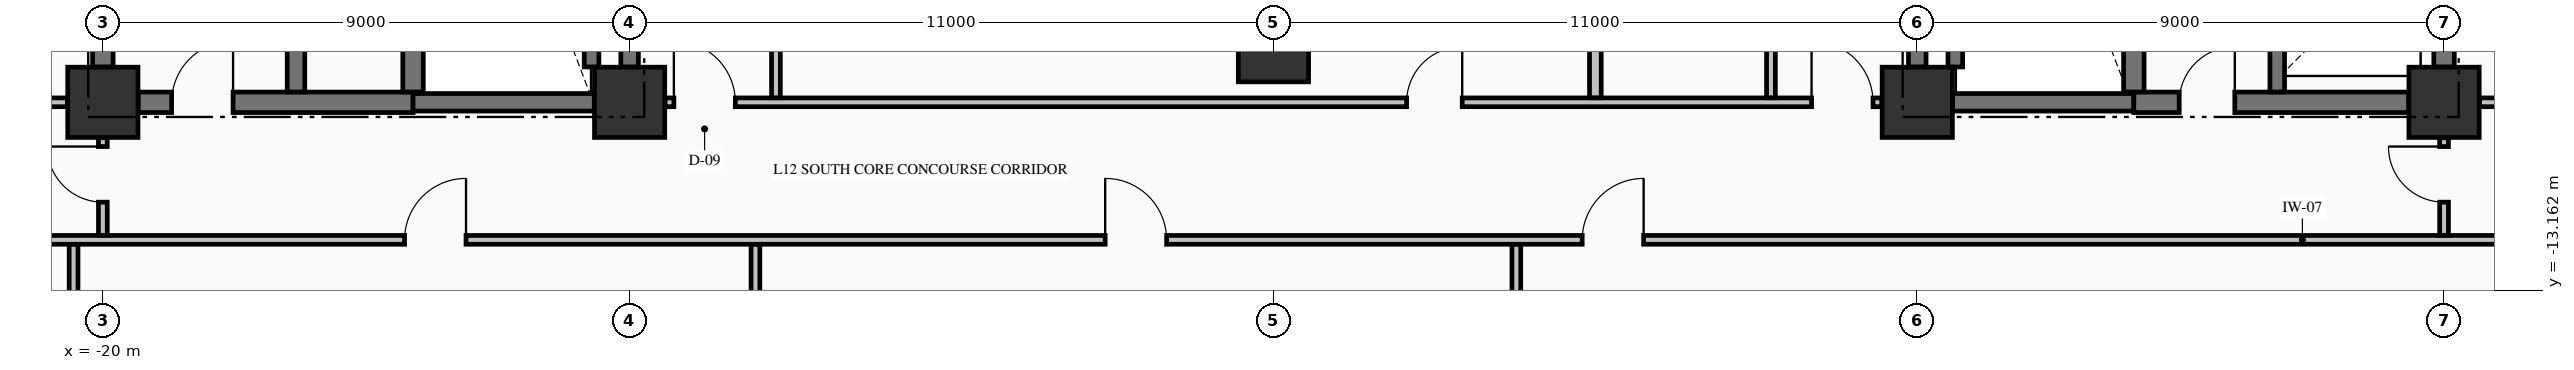
"""IFC4 building model, lengths in metres.
Left out: names, types, materials, properties, quantities, classifications, styles, units other than length and angle.
Written with IfcOpenShell. Run it as: python <this file> out.ifc"""

import sys

from ifc_helpers import new_model, si_unit, direction, frame, frame_2d, origin, origin_2d, place, context, subcontext, project, spatial, rectangle, extrude, element, fill, save


model = new_model("IFC4")
c1 = context("Model", 3, precision=1e-05, world=origin(), true_north=direction((0.0, 1.0)))
c2 = subcontext(c1, "Body", "Model", "MODEL_VIEW")
j1 = project(units=[si_unit("LENGTHUNIT", "METRE"), si_unit("PLANEANGLEUNIT", "RADIAN")], contexts=[c1])
p1 = place(None, origin())
s1 = spatial("IfcSite", under=j1, at=p1, CompositionType="ELEMENT")
p2 = place(p1, origin())
s2 = spatial("IfcBuilding", under=s1, at=p2, CompositionType="ELEMENT")
p3 = place(p2, frame((0.0, 0.0, 52.19)))
s3 = spatial("IfcBuildingStorey", under=s2, at=p3, CompositionType="ELEMENT", Elevation=52.19)
for number, where, z_axis, x_axis in (
    (1, (-20.0, -9.95, -0.425), (0.0, 0.0, 1.0), (1.0, 0.0, 0.0)),
    (2, (-11.0, -9.95, -0.425), (0.0, 0.0, 1.0), (1.0, 0.0, 0.0)),
    (3, (11.0, -9.95, -0.425), (0.0, 0.0, 1.0), (1.0, 0.0, 0.0)),
    (4, (20.0, -9.95, -0.425), (0.0, 0.0, 1.0), (1.0, 0.0, 0.0)),
    (5, (0.0, -9.0, -0.425), (0.0, 0.0, 1.0), (1.0, 0.0, 0.0)),
):
    element("IfcColumn", number, at=place(p3, frame(where, z_axis=z_axis, x_axis=x_axis)), inside=s3, PredefinedType="COLUMN", context=c2, shape_type="SweptSolid", body=[
        extrude(rectangle(XDim=1.2, YDim=1.2, at=origin_2d()), origin(), (0.0, 0.0, 1.0), 5.0),
    ])
p4 = place(p3, frame((-19.396, -9.95, 0.0), z_axis=(0.0, 0.0, 1.0), x_axis=(1.0, 0.0, 0.0)))
e6 = element("IfcWall", 6, at=p4, inside=s3, PredefinedType="SHEAR", context=c2, shape_type="SweptSolid", body=[
    extrude(rectangle(XDim=4.696, YDim=0.35, at=frame_2d((2.348, 0.0))), origin(), (0.0, 0.0, 1.0), 4.575),
])
p5 = place(p4, frame((0.571, 0.0, 0.0)))
e7 = element("IfcOpeningElement", 7, at=p5, cuts=e6, PredefinedType="OPENING", context=c2, shape_type="SweptSolid", body=[
    extrude(rectangle(XDim=1.05, YDim=2.15, at=frame_2d((0.525, 1.075))), frame((0.0, 0.185, 0.0), z_axis=(0.0, -1.0, 0.0), x_axis=(1.0, 0.0, 0.0)), (0.0, 0.0, 1.0), 0.37),
])
for number, where, z_axis, x_axis in (
    (8, (-14.7, -9.95, 0.0), (0.0, 0.0, 1.0), (1.0, 0.0, 0.0)),
    (9, (11.604, -9.95, 0.0), (0.0, 0.0, 1.0), (1.0, 0.0, 0.0)),
):
    element("IfcWall", number, at=place(p3, frame(where, z_axis=z_axis, x_axis=x_axis)), inside=s3, PredefinedType="SHEAR", context=c2, shape_type="SweptSolid", body=[
        extrude(rectangle(XDim=3.096, YDim=0.3, at=frame_2d((1.548, 0.0))), origin(), (0.0, 0.0, 1.0), 4.575),
    ])
p6 = place(p3, frame((14.7, -9.95, 0.0), z_axis=(0.0, 0.0, 1.0), x_axis=(1.0, 0.0, 0.0)))
e10 = element("IfcWall", 10, at=p6, inside=s3, PredefinedType="SHEAR", context=c2, shape_type="SweptSolid", body=[
    extrude(rectangle(XDim=4.696, YDim=0.35, at=frame_2d((2.348, 0.0))), origin(), (0.0, 0.0, 1.0), 4.575),
])
p7 = place(p6, frame((0.775, 0.0, 0.0)))
e11 = element("IfcOpeningElement", 11, at=p7, cuts=e10, PredefinedType="OPENING", context=c2, shape_type="SweptSolid", body=[
    extrude(rectangle(XDim=0.95, YDim=2.15, at=frame_2d((0.475, 1.075))), frame((0.0, 0.185, 0.0), z_axis=(0.0, -1.0, 0.0), x_axis=(1.0, 0.0, 0.0)), (0.0, 0.0, 1.0), 0.37),
])
p8 = place(p3, frame((-23.835, -12.3, 0.0), z_axis=(0.0, 0.0, 1.0), x_axis=(1.0, 0.0, 0.0)))
e12 = element("IfcWall", 12, at=p8, inside=s3, PredefinedType="PARTITIONING", context=c2, shape_type="SweptSolid", body=[
    extrude(rectangle(XDim=52.67, YDim=0.15, at=frame_2d((26.335, 0.0))), origin(), (0.0, 0.0, 1.0), 4.575),
])
p9 = place(p8, frame((8.99, 0.0, 0.0)))
e13 = element("IfcOpeningElement", 13, at=p9, cuts=e12, PredefinedType="OPENING", context=c2, shape_type="SweptSolid", body=[
    extrude(rectangle(XDim=1.05, YDim=2.15, at=frame_2d((0.525, 1.075))), frame((0.0, 0.085, 0.0), z_axis=(0.0, -1.0, 0.0), x_axis=(1.0, 0.0, 0.0)), (0.0, 0.0, 1.0), 0.17),
])
p10 = place(p8, frame((20.96, 0.0, 0.0)))
e14 = element("IfcOpeningElement", 14, at=p10, cuts=e12, PredefinedType="OPENING", context=c2, shape_type="SweptSolid", body=[
    extrude(rectangle(XDim=1.05, YDim=2.15, at=frame_2d((0.525, 1.075))), frame((0.0, 0.085, 0.0), z_axis=(0.0, -1.0, 0.0), x_axis=(1.0, 0.0, 0.0)), (0.0, 0.0, 1.0), 0.17),
])
p11 = place(p8, frame((29.11, 0.0, 0.0)))
e15 = element("IfcOpeningElement", 15, at=p11, cuts=e12, PredefinedType="OPENING", context=c2, shape_type="SweptSolid", body=[
    extrude(rectangle(XDim=1.05, YDim=2.15, at=frame_2d((0.525, 1.075))), frame((0.0, 0.085, 0.0), z_axis=(0.0, -1.0, 0.0), x_axis=(1.0, 0.0, 0.0)), (0.0, 0.0, 1.0), 0.17),
])
p12 = place(p3, frame((-23.835, -9.95, 0.0), z_axis=(0.0, 0.0, 1.0), x_axis=(1.0, 0.0, 0.0)))
e16 = element("IfcWall", 16, at=p12, inside=s3, PredefinedType="PARTITIONING", context=c2, shape_type="SweptSolid", body=[
    extrude(rectangle(XDim=3.229, YDim=0.15, at=frame_2d((1.615, 0.0))), origin(), (0.0, 0.0, 1.0), 4.575),
])
p13 = place(p12, frame((1.335, 0.0, 0.0)))
e17 = element("IfcOpeningElement", 17, at=p13, cuts=e16, PredefinedType="OPENING", context=c2, shape_type="SweptSolid", body=[
    extrude(rectangle(XDim=1.0, YDim=2.15, at=frame_2d((0.5, 1.075))), frame((0.0, 0.085, 0.0), z_axis=(0.0, -1.0, 0.0), x_axis=(1.0, 0.0, 0.0)), (0.0, 0.0, 1.0), 0.17),
])
p14 = place(p3, frame((-10.394, -9.95, 0.0), z_axis=(0.0, 0.0, 1.0), x_axis=(1.0, 0.0, 0.0)))
e18 = element("IfcWall", 18, at=p14, inside=s3, PredefinedType="PARTITIONING", context=c2, shape_type="SweptSolid", body=[
    extrude(rectangle(XDim=20.788, YDim=0.15, at=frame_2d((10.394, 0.0))), origin(), (0.0, 0.0, 1.0), 4.575),
])
p15 = place(p14, frame((0.15, 0.0, 0.0)))
e19 = element("IfcOpeningElement", 19, at=p15, cuts=e18, PredefinedType="OPENING", context=c2, shape_type="SweptSolid", body=[
    extrude(rectangle(XDim=1.05, YDim=2.15, at=frame_2d((0.525, 1.075))), frame((0.0, 0.085, 0.0), z_axis=(0.0, -1.0, 0.0), x_axis=(1.0, 0.0, 0.0)), (0.0, 0.0, 1.0), 0.17),
])
p16 = place(p14, frame((19.588, 0.0, 0.0)))
e20 = element("IfcOpeningElement", 20, at=p16, cuts=e18, PredefinedType="OPENING", context=c2, shape_type="SweptSolid", body=[
    extrude(rectangle(XDim=1.05, YDim=2.15, at=frame_2d((0.525, 1.075))), frame((0.0, 0.085, 0.0), z_axis=(0.0, -1.0, 0.0), x_axis=(1.0, 0.0, 0.0)), (0.0, 0.0, 1.0), 0.17),
])
p17 = place(p14, frame((12.669, 0.0, 0.0)))
e21 = element("IfcOpeningElement", 21, at=p17, cuts=e18, PredefinedType="OPENING", context=c2, shape_type="SweptSolid", body=[
    extrude(rectangle(XDim=0.95, YDim=2.15, at=frame_2d((0.475, 1.075))), frame((0.0, 0.085, 0.0), z_axis=(0.0, -1.0, 0.0), x_axis=(1.0, 0.0, 0.0)), (0.0, 0.0, 1.0), 0.17),
])
p18 = place(p3, frame((20.606, -9.95, 0.0), z_axis=(0.0, 0.0, 1.0), x_axis=(1.0, 0.0, 0.0)))
e22 = element("IfcWall", 22, at=p18, inside=s3, PredefinedType="PARTITIONING", context=c2, shape_type="SweptSolid", body=[
    extrude(rectangle(XDim=8.229, YDim=0.15, at=frame_2d((4.115, 0.0))), origin(), (0.0, 0.0, 1.0), 4.575),
])
p19 = place(p18, frame((3.419, 0.0, 0.0)))
e23 = element("IfcOpeningElement", 23, at=p19, cuts=e22, PredefinedType="OPENING", context=c2, shape_type="SweptSolid", body=[
    extrude(rectangle(XDim=0.95, YDim=2.02, at=frame_2d((0.475, 1.01))), frame((0.0, 0.085, 0.0), z_axis=(0.0, -1.0, 0.0), x_axis=(1.0, 0.0, 0.0)), (0.0, 0.0, 1.0), 0.17),
])
p20 = place(p3, frame((-20.0, -9.346, 0.0), z_axis=(0.0, 0.0, 1.0), x_axis=(0.0, 1.0, 0.0)))
e24 = element("IfcWall", 24, at=p20, inside=s3, PredefinedType="SHEAR", context=c2, shape_type="SweptSolid", body=[
    extrude(rectangle(XDim=8.742, YDim=0.35, at=frame_2d((4.371, 0.0))), origin(), (0.0, 0.0, 1.0), 4.575),
])
p21 = place(p3, frame((-16.7, -9.773, 0.0), z_axis=(0.0, 0.0, 1.0), x_axis=(0.0, 1.0, 0.0)))
e25 = element("IfcWall", 25, at=p21, inside=s3, PredefinedType="SHEAR", context=c2, shape_type="SweptSolid", body=[
    extrude(rectangle(XDim=9.371, YDim=0.3, at=frame_2d((4.686, 0.0))), origin(), (0.0, 0.0, 1.0), 4.575),
])
p22 = place(p3, frame((-14.7, -9.773, 0.0), z_axis=(0.0, 0.0, 1.0), x_axis=(0.0, 1.0, 0.0)))
e26 = element("IfcWall", 26, at=p22, inside=s3, PredefinedType="SHEAR", context=c2, shape_type="SweptSolid", body=[
    extrude(rectangle(XDim=9.371, YDim=0.35, at=frame_2d((4.686, 0.0))), origin(), (0.0, 0.0, 1.0), 4.575),
])
p23 = place(p3, frame((-11.65, -9.346, 0.0), z_axis=(0.0, 0.0, 1.0), x_axis=(0.0, 1.0, 0.0)))
e27 = element("IfcWall", 27, at=p23, inside=s3, PredefinedType="SOLIDWALL", context=c2, shape_type="SweptSolid", body=[
    extrude(rectangle(XDim=8.742, YDim=0.25, at=frame_2d((4.371, 0.0))), origin(), (0.0, 0.0, 1.0), 4.575),
])
for number, where, z_axis, x_axis in (
    (28, (-11.0, -9.346, 0.0), (0.0, 0.0, 1.0), (0.0, 1.0, 0.0)),
    (29, (11.0, -9.346, 0.0), (0.0, 0.0, 1.0), (0.0, 1.0, 0.0)),
):
    element("IfcWall", number, at=place(p3, frame(where, z_axis=z_axis, x_axis=x_axis)), inside=s3, PredefinedType="SHEAR", context=c2, shape_type="SweptSolid", body=[
        extrude(rectangle(XDim=8.742, YDim=0.3, at=frame_2d((4.371, 0.0))), origin(), (0.0, 0.0, 1.0), 4.575),
    ])
p24 = place(p3, frame((11.65, -9.346, 0.0), z_axis=(0.0, 0.0, 1.0), x_axis=(0.0, 1.0, 0.0)))
e30 = element("IfcWall", 30, at=p24, inside=s3, PredefinedType="SOLIDWALL", context=c2, shape_type="SweptSolid", body=[
    extrude(rectangle(XDim=8.742, YDim=0.25, at=frame_2d((4.371, 0.0))), origin(), (0.0, 0.0, 1.0), 4.575),
])
p25 = place(p3, frame((14.7, -9.773, 0.0), z_axis=(0.0, 0.0, 1.0), x_axis=(0.0, 1.0, 0.0)))
e31 = element("IfcWall", 31, at=p25, inside=s3, PredefinedType="SHEAR", context=c2, shape_type="SweptSolid", body=[
    extrude(rectangle(XDim=9.371, YDim=0.35, at=frame_2d((4.686, 0.0))), origin(), (0.0, 0.0, 1.0), 4.575),
])
p26 = place(p3, frame((17.15, -9.773, 0.0), z_axis=(0.0, 0.0, 1.0), x_axis=(0.0, 1.0, 0.0)))
e32 = element("IfcWall", 32, at=p26, inside=s3, PredefinedType="SOLIDWALL", context=c2, shape_type="SweptSolid", body=[
    extrude(rectangle(XDim=2.596, YDim=0.25, at=frame_2d((1.298, 0.0))), origin(), (0.0, 0.0, 1.0), 4.575),
])
p27 = place(p3, frame((20.0, -9.346, 0.0), z_axis=(0.0, 0.0, 1.0), x_axis=(0.0, 1.0, 0.0)))
e33 = element("IfcWall", 33, at=p27, inside=s3, PredefinedType="SHEAR", context=c2, shape_type="SweptSolid", body=[
    extrude(rectangle(XDim=2.169, YDim=0.35, at=frame_2d((1.084, 0.0))), origin(), (0.0, 0.0, 1.0), 4.575),
])
p28 = place(p3, frame((-20.5, -22.294, 0.0), z_axis=(0.0, 0.0, 1.0), x_axis=(0.0, 1.0, 0.0)))
e34 = element("IfcWall", 34, at=p28, inside=s3, PredefinedType="PARTITIONING", context=c2, shape_type="SweptSolid", body=[
    extrude(rectangle(XDim=9.916, YDim=0.15, at=frame_2d((4.958, 0.0))), origin(), (0.0, 0.0, 1.0), 4.575),
])
p29 = place(p3, frame((-20.0, -12.222, 0.0), z_axis=(0.0, 0.0, 1.0), x_axis=(0.0, 1.0, 0.0)))
e35 = element("IfcWall", 35, at=p29, inside=s3, PredefinedType="PARTITIONING", context=c2, shape_type="SweptSolid", body=[
    extrude(rectangle(XDim=1.666, YDim=0.15, at=frame_2d((0.833, 0.0))), origin(), (0.0, 0.0, 1.0), 4.575),
])
p30 = place(p29, frame((0.566, 0.0, 0.0)))
e36 = element("IfcOpeningElement", 36, at=p30, cuts=e35, PredefinedType="OPENING", context=c2, shape_type="SweptSolid", body=[
    extrude(rectangle(XDim=0.95, YDim=2.02, at=frame_2d((0.475, 1.01))), frame((0.0, 0.085, 0.0), z_axis=(0.0, -1.0, 0.0), x_axis=(1.0, 0.0, 0.0)), (0.0, 0.0, 1.0), 0.17),
])
p31 = place(p3, frame((-8.85, -26.335, 0.0), z_axis=(0.0, 0.0, 1.0), x_axis=(0.0, 1.0, 0.0)))
e37 = element("IfcWall", 37, at=p31, inside=s3, PredefinedType="PARTITIONING", context=c2, shape_type="SweptSolid", body=[
    extrude(rectangle(XDim=13.957, YDim=0.15, at=frame_2d((6.979, 0.0))), origin(), (0.0, 0.0, 1.0), 4.575),
])
p32 = place(p3, frame((-8.5, -9.872, 0.0), z_axis=(0.0, 0.0, 1.0), x_axis=(0.0, 1.0, 0.0)))
e38 = element("IfcWall", 38, at=p32, inside=s3, PredefinedType="PARTITIONING", context=c2, shape_type="SweptSolid", body=[
    extrude(rectangle(XDim=8.369, YDim=0.15, at=frame_2d((4.185, 0.0))), origin(), (0.0, 0.0, 1.0), 4.575),
])
p33 = place(p32, frame((3.727, 0.0, 0.0)))
e39 = element("IfcOpeningElement", 39, at=p33, cuts=e38, PredefinedType="OPENING", context=c2, shape_type="SweptSolid", body=[
    extrude(rectangle(XDim=0.95, YDim=2.15, at=frame_2d((0.475, 1.075))), frame((0.0, 0.085, 0.0), z_axis=(0.0, -1.0, 0.0), x_axis=(1.0, 0.0, 0.0)), (0.0, 0.0, 1.0), 0.17),
])
p34 = place(p3, frame((4.15, -26.335, 0.0), z_axis=(0.0, 0.0, 1.0), x_axis=(0.0, 1.0, 0.0)))
e40 = element("IfcWall", 40, at=p34, inside=s3, PredefinedType="PARTITIONING", context=c2, shape_type="SweptSolid", body=[
    extrude(rectangle(XDim=13.957, YDim=0.15, at=frame_2d((6.979, 0.0))), origin(), (0.0, 0.0, 1.0), 4.575),
])
p35 = place(p3, frame((5.5, -9.872, 0.0), z_axis=(0.0, 0.0, 1.0), x_axis=(0.0, 1.0, 0.0)))
e41 = element("IfcWall", 41, at=p35, inside=s3, PredefinedType="PARTITIONING", context=c2, shape_type="SweptSolid", body=[
    extrude(rectangle(XDim=4.969, YDim=0.2, at=frame_2d((2.484, 0.0))), origin(), (0.0, 0.0, 1.0), 4.575),
])
p36 = place(p3, frame((8.5, -9.872, 0.0), z_axis=(0.0, 0.0, 1.0), x_axis=(0.0, 1.0, 0.0)))
e42 = element("IfcWall", 42, at=p36, inside=s3, PredefinedType="PARTITIONING", context=c2, shape_type="SweptSolid", body=[
    extrude(rectangle(XDim=4.969, YDim=0.15, at=frame_2d((2.484, 0.0))), origin(), (0.0, 0.0, 1.0), 4.575),
])
p37 = place(p36, frame((1.997, 0.0, 0.0)))
e43 = element("IfcOpeningElement", 43, at=p37, cuts=e42, PredefinedType="OPENING", context=c2, shape_type="SweptSolid", body=[
    extrude(rectangle(XDim=0.95, YDim=2.15, at=frame_2d((0.475, 1.075))), frame((0.0, 0.085, 0.0), z_axis=(0.0, -1.0, 0.0), x_axis=(1.0, 0.0, 0.0)), (0.0, 0.0, 1.0), 0.17),
])
p38 = place(p3, frame((20.0, -12.222, 0.0), z_axis=(0.0, 0.0, 1.0), x_axis=(0.0, 1.0, 0.0)))
e44 = element("IfcWall", 44, at=p38, inside=s3, PredefinedType="PARTITIONING", context=c2, shape_type="SweptSolid", body=[
    extrude(rectangle(XDim=1.666, YDim=0.15, at=frame_2d((0.833, 0.0))), origin(), (0.0, 0.0, 1.0), 4.575),
])
p39 = place(p38, frame((0.566, 0.0, 0.0)))
e45 = element("IfcOpeningElement", 45, at=p39, cuts=e44, PredefinedType="OPENING", context=c2, shape_type="SweptSolid", body=[
    extrude(rectangle(XDim=0.95, YDim=2.02, at=frame_2d((0.475, 1.01))), frame((0.0, 0.085, 0.0), z_axis=(0.0, -1.0, 0.0), x_axis=(1.0, 0.0, 0.0)), (0.0, 0.0, 1.0), 0.17),
])
p40 = place(p5, origin())
e46 = element("IfcDoor", 46, at=p40, inside=s3, OperationType="SINGLE_SWING_RIGHT", PredefinedType="DOOR", context=c2, shape_type="SweptSolid", body=[
    extrude(rectangle(XDim=1.05, YDim=2.15, at=frame_2d((0.525, 1.075))), frame((0.0, 0.025, 0.0), z_axis=(0.0, -1.0, 0.0), x_axis=(1.0, 0.0, 0.0)), (0.0, 0.0, 1.0), 0.05),
])
fill(e7, e46)
p41 = place(p7, origin())
e47 = element("IfcDoor", 47, at=p41, inside=s3, OperationType="SINGLE_SWING_RIGHT", PredefinedType="DOOR", context=c2, shape_type="SweptSolid", body=[
    extrude(rectangle(XDim=0.95, YDim=2.15, at=frame_2d((0.475, 1.075))), frame((0.0, 0.025, 0.0), z_axis=(0.0, -1.0, 0.0), x_axis=(1.0, 0.0, 0.0)), (0.0, 0.0, 1.0), 0.05),
])
fill(e11, e47)
p42 = place(p15, origin())
e48 = element("IfcDoor", 48, at=p42, inside=s3, OperationType="SINGLE_SWING_LEFT", PredefinedType="DOOR", context=c2, shape_type="SweptSolid", body=[
    extrude(rectangle(XDim=1.05, YDim=2.15, at=frame_2d((0.525, 1.075))), frame((0.0, 0.025, 0.0), z_axis=(0.0, -1.0, 0.0), x_axis=(1.0, 0.0, 0.0)), (0.0, 0.0, 1.0), 0.05),
])
fill(e19, e48)
p43 = place(p16, origin())
e49 = element("IfcDoor", 49, at=p43, inside=s3, OperationType="SINGLE_SWING_LEFT", PredefinedType="DOOR", context=c2, shape_type="SweptSolid", body=[
    extrude(rectangle(XDim=1.05, YDim=2.15, at=frame_2d((0.525, 1.075))), frame((0.0, 0.025, 0.0), z_axis=(0.0, -1.0, 0.0), x_axis=(1.0, 0.0, 0.0)), (0.0, 0.0, 1.0), 0.05),
])
fill(e20, e49)
p44 = place(p9, origin())
e50 = element("IfcDoor", 50, at=p44, inside=s3, OperationType="SINGLE_SWING_RIGHT", PredefinedType="DOOR", context=c2, shape_type="SweptSolid", body=[
    extrude(rectangle(XDim=1.05, YDim=2.15, at=frame_2d((0.525, 1.075))), frame((0.0, 0.025, 0.0), z_axis=(0.0, -1.0, 0.0), x_axis=(1.0, 0.0, 0.0)), (0.0, 0.0, 1.0), 0.05),
])
fill(e13, e50)
p45 = place(p10, origin())
e51 = element("IfcDoor", 51, at=p45, inside=s3, OperationType="SINGLE_SWING_LEFT", PredefinedType="DOOR", context=c2, shape_type="SweptSolid", body=[
    extrude(rectangle(XDim=1.05, YDim=2.15, at=frame_2d((0.525, 1.075))), frame((0.0, 0.025, 0.0), z_axis=(0.0, -1.0, 0.0), x_axis=(1.0, 0.0, 0.0)), (0.0, 0.0, 1.0), 0.05),
])
fill(e14, e51)
p46 = place(p11, origin())
e52 = element("IfcDoor", 52, at=p46, inside=s3, OperationType="SINGLE_SWING_RIGHT", PredefinedType="DOOR", context=c2, shape_type="SweptSolid", body=[
    extrude(rectangle(XDim=1.05, YDim=2.15, at=frame_2d((0.525, 1.075))), frame((0.0, 0.025, 0.0), z_axis=(0.0, -1.0, 0.0), x_axis=(1.0, 0.0, 0.0)), (0.0, 0.0, 1.0), 0.05),
])
fill(e15, e52)
p47 = place(p17, origin())
e53 = element("IfcDoor", 53, at=p47, inside=s3, OperationType="SINGLE_SWING_RIGHT", PredefinedType="DOOR", context=c2, shape_type="SweptSolid", body=[
    extrude(rectangle(XDim=0.95, YDim=2.15, at=frame_2d((0.475, 1.075))), frame((0.0, 0.025, 0.0), z_axis=(0.0, -1.0, 0.0), x_axis=(1.0, 0.0, 0.0)), (0.0, 0.0, 1.0), 0.05),
])
fill(e21, e53)
p48 = place(p30, origin())
e54 = element("IfcDoor", 54, at=p48, inside=s3, OperationType="SINGLE_SWING_RIGHT", PredefinedType="DOOR", context=c2, shape_type="SweptSolid", body=[
    extrude(rectangle(XDim=0.95, YDim=2.02, at=frame_2d((0.475, 1.01))), frame((0.0, 0.025, 0.0), z_axis=(0.0, -1.0, 0.0), x_axis=(1.0, 0.0, 0.0)), (0.0, 0.0, 1.0), 0.05),
])
fill(e36, e54)
p49 = place(p39, origin())
e55 = element("IfcDoor", 55, at=p49, inside=s3, OperationType="SINGLE_SWING_RIGHT", PredefinedType="DOOR", context=c2, shape_type="SweptSolid", body=[
    extrude(rectangle(XDim=0.95, YDim=2.02, at=frame_2d((0.475, 1.01))), frame((0.0, 0.025, 0.0), z_axis=(0.0, -1.0, 0.0), x_axis=(1.0, 0.0, 0.0)), (0.0, 0.0, 1.0), 0.05),
])
fill(e45, e55)
save(model, sys.argv[1])
